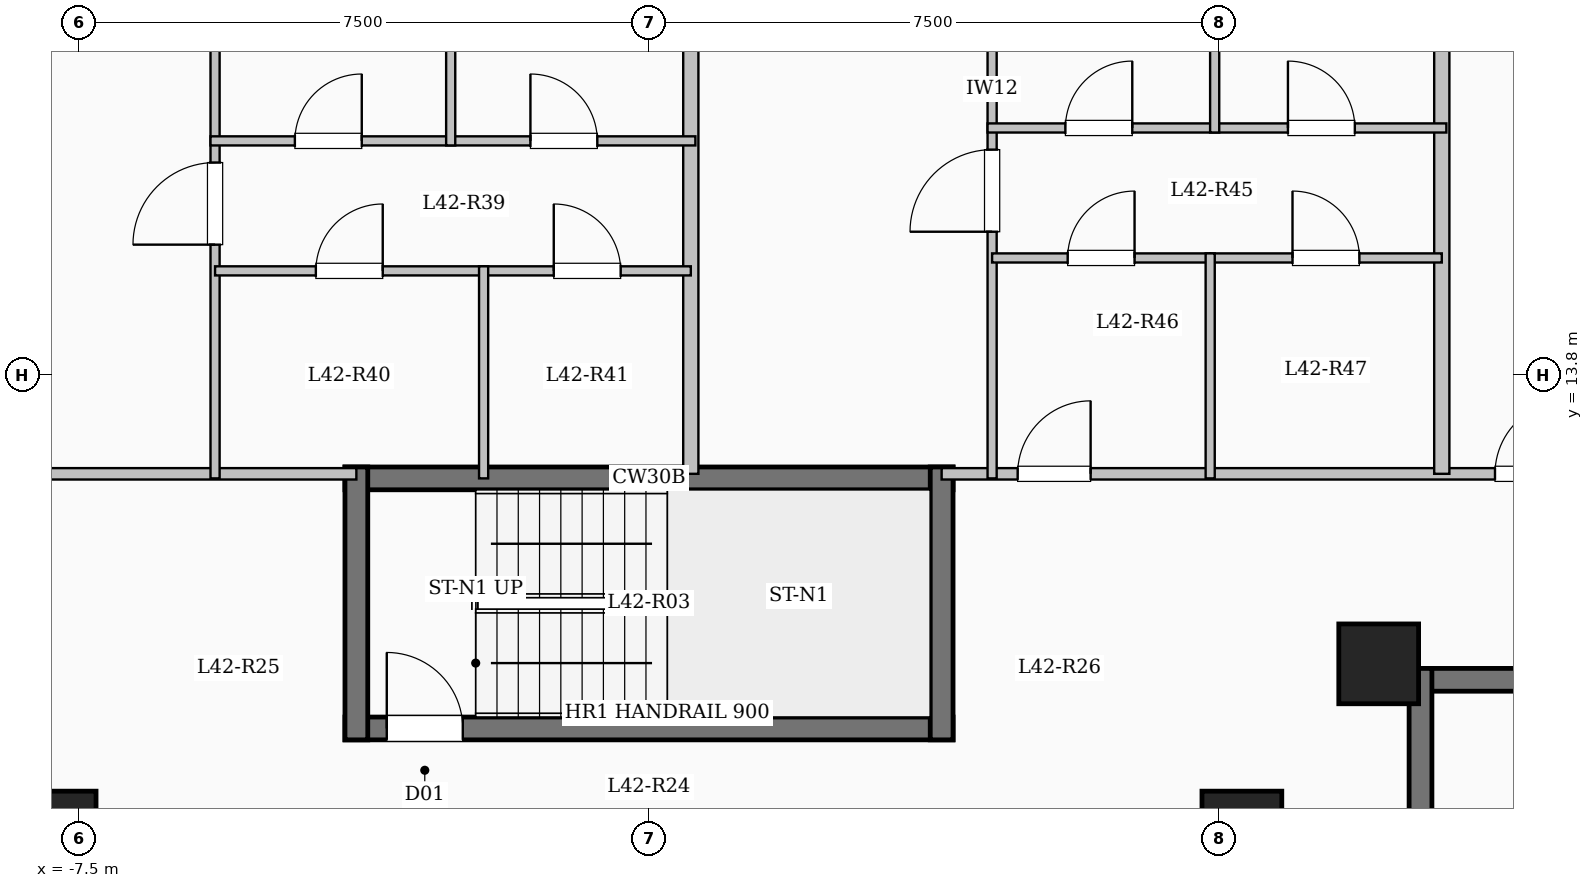
"""IFC4 building model, lengths in metres.
Left out: names, types, materials, properties, quantities, classifications, styles, units other than length and angle.
Written with IfcOpenShell. Run it as: python <this file> out.ifc"""

import sys

from ifc_helpers import new_model, si_unit, direction, frame, frame_2d, origin, origin_2d, place, context, subcontext, project, spatial, rectangle, extrude, element, fill, save


model = new_model("IFC4")
c1 = context("Model", 3, precision=1e-05, world=origin(), true_north=direction((0.0, 1.0)))
c2 = subcontext(c1, "Body", "Model", "MODEL_VIEW")
j1 = project(units=[si_unit("LENGTHUNIT", "METRE"), si_unit("PLANEANGLEUNIT", "RADIAN")], contexts=[c1])
p1 = place(None, origin())
s1 = spatial("IfcSite", under=j1, at=p1, CompositionType="ELEMENT")
p2 = place(p1, origin())
s2 = spatial("IfcBuilding", under=s1, at=p2, CompositionType="ELEMENT")
p3 = place(p2, frame((0.0, 0.0, 156.05)))
s3 = spatial("IfcBuildingStorey", under=s2, at=p3, CompositionType="ELEMENT", Elevation=156.05)
for number, where, z_axis, x_axis in (
    (1, (-7.8, 7.8, 0.0), (0.0, 0.0, 1.0), (1.0, 0.0, 0.0)),
    (2, (7.8, 7.8, 0.0), (0.0, 0.0, 1.0), (1.0, 0.0, 0.0)),
    (3, (9.6, 10.0, 0.0), (0.0, 0.0, 1.0), (1.0, 0.0, 0.0)),
):
    element("IfcColumn", number, at=place(p3, frame(where, z_axis=z_axis, x_axis=x_axis)), inside=s3, PredefinedType="COLUMN", context=c2, shape_type="SweptSolid", body=[
        extrude(rectangle(XDim=1.05, YDim=1.05, at=origin_2d()), origin(), (0.0, 0.0, 1.0), 3.35),
    ])
p4 = place(p3, frame((10.0, 9.79, 0.0), z_axis=(0.0, 0.0, 1.0), x_axis=(1.0, 0.0, 0.0)))
e4 = element("IfcWall", 4, at=p4, inside=s3, PredefinedType="SHEAR", context=c2, shape_type="SweptSolid", body=[
    extrude(rectangle(XDim=8.0, YDim=0.3, at=frame_2d((4.0, 0.0))), origin(), (0.0, 0.0, 1.0), 3.35),
])
p5 = place(p3, frame((10.15, 6.35, 0.0), z_axis=(0.0, 0.0, 1.0), x_axis=(0.0, 1.0, 0.0)))
e5 = element("IfcWall", 5, at=p5, inside=s3, PredefinedType="SHEAR", context=c2, shape_type="SweptSolid", body=[
    extrude(rectangle(XDim=3.59, YDim=0.3, at=frame_2d((1.795, 0.0))), origin(), (0.0, 0.0, 1.0), 3.35),
])
p6 = place(p3, frame((-4.0, 12.44, 0.0), z_axis=(0.0, 0.0, 1.0), x_axis=(1.0, 0.0, 0.0)))
e6 = element("IfcWall", 6, at=p6, inside=s3, PredefinedType="SHEAR", context=c2, shape_type="SweptSolid", body=[
    extrude(rectangle(XDim=8.0, YDim=0.3, at=frame_2d((4.0, 0.0))), origin(), (0.0, 0.0, 1.0), 3.35),
])
p7 = place(p3, frame((-4.0, 9.15, 0.0), z_axis=(0.0, 0.0, 1.0), x_axis=(1.0, 0.0, 0.0)))
e7 = element("IfcWall", 7, at=p7, inside=s3, PredefinedType="SHEAR", context=c2, shape_type="SweptSolid", body=[
    extrude(rectangle(XDim=8.0, YDim=0.3, at=frame_2d((4.0, 0.0))), origin(), (0.0, 0.0, 1.0), 3.35),
])
p8 = place(p7, frame((0.55, 0.0, 0.0)))
e8 = element("IfcOpeningElement", 8, at=p8, cuts=e7, PredefinedType="OPENING", context=c2, shape_type="SweptSolid", body=[
    extrude(rectangle(XDim=1.0, YDim=2.15, at=frame_2d((0.5, 1.075))), frame((0.0, 0.16, 0.0), z_axis=(0.0, -1.0, 0.0), x_axis=(1.0, 0.0, 0.0)), (0.0, 0.0, 1.0), 0.32),
])
for number, where, z_axis, x_axis in (
    (9, (-3.85, 9.0, 0.0), (0.0, 0.0, 1.0), (0.0, 1.0, 0.0)),
    (10, (3.85, 9.0, 0.0), (0.0, 0.0, 1.0), (0.0, 1.0, 0.0)),
):
    element("IfcWall", number, at=place(p3, frame(where, z_axis=z_axis, x_axis=x_axis)), inside=s3, PredefinedType="SHEAR", context=c2, shape_type="SweptSolid", body=[
        extrude(rectangle(XDim=3.59, YDim=0.3, at=frame_2d((1.795, 0.0))), origin(), (0.0, 0.0, 1.0), 3.35),
    ])
p9 = place(p3, frame((-19.55, 12.5, 0.0), z_axis=(0.0, 0.0, 1.0), x_axis=(1.0, 0.0, 0.0)))
e11 = element("IfcWall", 11, at=p9, inside=s3, PredefinedType="PARTITIONING", context=c2, shape_type="SweptSolid", body=[
    extrude(rectangle(XDim=15.7, YDim=0.15, at=frame_2d((7.85, 0.0))), origin(), (0.0, 0.0, 1.0), 3.1),
])
p10 = place(p9, frame((0.7, 0.0, 0.0)))
e12 = element("IfcOpeningElement", 12, at=p10, cuts=e11, PredefinedType="OPENING", context=c2, shape_type="SweptSolid", body=[
    extrude(rectangle(XDim=0.96, YDim=2.15, at=frame_2d((0.48, 1.075))), frame((0.0, 0.085, 0.0), z_axis=(0.0, -1.0, 0.0), x_axis=(1.0, 0.0, 0.0)), (0.0, 0.0, 1.0), 0.17),
])
p11 = place(p9, frame((10.348, 0.0, 0.0)))
e13 = element("IfcOpeningElement", 13, at=p11, cuts=e11, PredefinedType="OPENING", context=c2, shape_type="SweptSolid", body=[
    extrude(rectangle(XDim=0.96, YDim=2.15, at=frame_2d((0.48, 1.075))), frame((0.0, 0.085, 0.0), z_axis=(0.0, -1.0, 0.0), x_axis=(1.0, 0.0, 0.0)), (0.0, 0.0, 1.0), 0.17),
])
p12 = place(p3, frame((3.85, 12.5, 0.0), z_axis=(0.0, 0.0, 1.0), x_axis=(1.0, 0.0, 0.0)))
e14 = element("IfcWall", 14, at=p12, inside=s3, PredefinedType="PARTITIONING", context=c2, shape_type="SweptSolid", body=[
    extrude(rectangle(XDim=15.7, YDim=0.15, at=frame_2d((7.85, 0.0))), origin(), (0.0, 0.0, 1.0), 3.1),
])
p13 = place(p12, frame((1.0, 0.0, 0.0)))
e15 = element("IfcOpeningElement", 15, at=p13, cuts=e14, PredefinedType="OPENING", context=c2, shape_type="SweptSolid", body=[
    extrude(rectangle(XDim=0.96, YDim=2.15, at=frame_2d((0.48, 1.075))), frame((0.0, 0.085, 0.0), z_axis=(0.0, -1.0, 0.0), x_axis=(1.0, 0.0, 0.0)), (0.0, 0.0, 1.0), 0.17),
])
p14 = place(p12, frame((7.28, 0.0, 0.0)))
e16 = element("IfcOpeningElement", 16, at=p14, cuts=e14, PredefinedType="OPENING", context=c2, shape_type="SweptSolid", body=[
    extrude(rectangle(XDim=0.96, YDim=2.15, at=frame_2d((0.48, 1.075))), frame((0.0, 0.085, 0.0), z_axis=(0.0, -1.0, 0.0), x_axis=(1.0, 0.0, 0.0)), (0.0, 0.0, 1.0), 0.17),
])
p15 = place(p3, frame((0.55, 12.5, 0.0), z_axis=(0.0, 0.0, 1.0), x_axis=(0.0, 1.0, 0.0)))
e17 = element("IfcWall", 17, at=p15, inside=s3, PredefinedType="SOLIDWALL", context=c2, shape_type="SweptSolid", body=[
    extrude(rectangle(XDim=10.18, YDim=0.2, at=frame_2d((5.09, 0.0))), origin(), (0.0, 0.0, 1.0), 3.1),
])
p16 = place(p3, frame((-5.709, 12.44, 0.0), z_axis=(0.0, 0.0, 1.0), x_axis=(0.0, 1.0, 0.0)))
e18 = element("IfcWall", 18, at=p16, inside=s3, PredefinedType="PARTITIONING", context=c2, shape_type="SweptSolid", body=[
    extrude(rectangle(XDim=10.065, YDim=0.12, at=frame_2d((5.032, 0.0))), origin(), (0.0, 0.0, 1.0), 3.1),
])
p17 = place(p16, frame((3.075, 0.0, 0.0)))
e19 = element("IfcOpeningElement", 19, at=p17, cuts=e18, PredefinedType="OPENING", context=c2, shape_type="SweptSolid", body=[
    extrude(rectangle(XDim=1.08, YDim=2.15, at=frame_2d((0.54, 1.075))), frame((0.0, 0.07, 0.0), z_axis=(0.0, -1.0, 0.0), x_axis=(1.0, 0.0, 0.0)), (0.0, 0.0, 1.0), 0.14),
])
p18 = place(p3, frame((-5.709, 15.17, 0.0), z_axis=(0.0, 0.0, 1.0), x_axis=(1.0, 0.0, 0.0)))
e20 = element("IfcWall", 20, at=p18, inside=s3, PredefinedType="PARTITIONING", context=c2, shape_type="SweptSolid", body=[
    extrude(rectangle(XDim=3.533, YDim=0.12, at=frame_2d((1.767, 0.0))), origin(), (0.0, 0.0, 1.0), 3.1),
])
p19 = place(p18, frame((1.326, 0.0, 0.0)))
e21 = element("IfcOpeningElement", 21, at=p19, cuts=e20, PredefinedType="OPENING", context=c2, shape_type="SweptSolid", body=[
    extrude(rectangle(XDim=0.88, YDim=2.1, at=frame_2d((0.44, 1.05))), frame((0.0, 0.07, 0.0), z_axis=(0.0, -1.0, 0.0), x_axis=(1.0, 0.0, 0.0)), (0.0, 0.0, 1.0), 0.14),
])
p20 = place(p3, frame((-2.176, 15.17, 0.0), z_axis=(0.0, 0.0, 1.0), x_axis=(1.0, 0.0, 0.0)))
e22 = element("IfcWall", 22, at=p20, inside=s3, PredefinedType="PARTITIONING", context=c2, shape_type="SweptSolid", body=[
    extrude(rectangle(XDim=2.726, YDim=0.12, at=frame_2d((1.363, 0.0))), origin(), (0.0, 0.0, 1.0), 3.1),
])
p21 = place(p20, frame((0.923, 0.0, 0.0)))
e23 = element("IfcOpeningElement", 23, at=p21, cuts=e22, PredefinedType="OPENING", context=c2, shape_type="SweptSolid", body=[
    extrude(rectangle(XDim=0.88, YDim=2.1, at=frame_2d((0.44, 1.05))), frame((0.0, 0.07, 0.0), z_axis=(0.0, -1.0, 0.0), x_axis=(1.0, 0.0, 0.0)), (0.0, 0.0, 1.0), 0.14),
])
p22 = place(p3, frame((-5.769, 16.88, 0.0), z_axis=(0.0, 0.0, 1.0), x_axis=(1.0, 0.0, 0.0)))
e24 = element("IfcWall", 24, at=p22, inside=s3, PredefinedType="PARTITIONING", context=c2, shape_type="SweptSolid", body=[
    extrude(rectangle(XDim=6.379, YDim=0.12, at=frame_2d((3.189, 0.0))), origin(), (0.0, 0.0, 1.0), 2.685),
])
p23 = place(p22, frame((1.11, 0.0, 0.0)))
e25 = element("IfcOpeningElement", 25, at=p23, cuts=e24, PredefinedType="OPENING", context=c2, shape_type="SweptSolid", body=[
    extrude(rectangle(XDim=0.88, YDim=2.1, at=frame_2d((0.44, 1.05))), frame((0.0, 0.07, 0.0), z_axis=(0.0, -1.0, 0.0), x_axis=(1.0, 0.0, 0.0)), (0.0, 0.0, 1.0), 0.14),
])
p24 = place(p22, frame((4.209, 0.0, 0.0)))
e26 = element("IfcOpeningElement", 26, at=p24, cuts=e24, PredefinedType="OPENING", context=c2, shape_type="SweptSolid", body=[
    extrude(rectangle(XDim=0.88, YDim=2.1, at=frame_2d((0.44, 1.05))), frame((0.0, 0.07, 0.0), z_axis=(0.0, -1.0, 0.0), x_axis=(1.0, 0.0, 0.0)), (0.0, 0.0, 1.0), 0.14),
])
p25 = place(p3, frame((-2.176, 12.44, 0.0), z_axis=(0.0, 0.0, 1.0), x_axis=(0.0, 1.0, 0.0)))
e27 = element("IfcWall", 27, at=p25, inside=s3, PredefinedType="PARTITIONING", context=c2, shape_type="SweptSolid", body=[
    extrude(rectangle(XDim=2.79, YDim=0.12, at=frame_2d((1.395, 0.0))), origin(), (0.0, 0.0, 1.0), 3.1),
])
p26 = place(p3, frame((-2.609, 16.82, 0.0), z_axis=(0.0, 0.0, 1.0), x_axis=(0.0, 1.0, 0.0)))
e28 = element("IfcWall", 28, at=p26, inside=s3, PredefinedType="PARTITIONING", context=c2, shape_type="SweptSolid", body=[
    extrude(rectangle(XDim=5.86, YDim=0.12, at=frame_2d((2.93, 0.0))), origin(), (0.0, 0.0, 1.0), 3.1),
])
p27 = place(p3, frame((10.43, 12.5, 0.0), z_axis=(0.0, 0.0, 1.0), x_axis=(0.0, 1.0, 0.0)))
e29 = element("IfcWall", 29, at=p27, inside=s3, PredefinedType="SOLIDWALL", context=c2, shape_type="SweptSolid", body=[
    extrude(rectangle(XDim=8.841, YDim=0.2, at=frame_2d((4.42, 0.0))), origin(), (0.0, 0.0, 1.0), 3.1),
])
p28 = place(p3, frame((4.514, 12.44, 0.0), z_axis=(0.0, 0.0, 1.0), x_axis=(0.0, 1.0, 0.0)))
e30 = element("IfcWall", 30, at=p28, inside=s3, PredefinedType="PARTITIONING", context=c2, shape_type="SweptSolid", body=[
    extrude(rectangle(XDim=10.24, YDim=0.12, at=frame_2d((5.12, 0.0))), origin(), (0.0, 0.0, 1.0), 3.1),
])
p29 = place(p28, frame((3.245, 0.0, 0.0)))
e31 = element("IfcOpeningElement", 31, at=p29, cuts=e30, PredefinedType="OPENING", context=c2, shape_type="SweptSolid", body=[
    extrude(rectangle(XDim=1.08, YDim=2.15, at=frame_2d((0.54, 1.075))), frame((0.0, 0.07, 0.0), z_axis=(0.0, -1.0, 0.0), x_axis=(1.0, 0.0, 0.0)), (0.0, 0.0, 1.0), 0.14),
])
p30 = place(p3, frame((4.514, 15.34, 0.0), z_axis=(0.0, 0.0, 1.0), x_axis=(1.0, 0.0, 0.0)))
e32 = element("IfcWall", 32, at=p30, inside=s3, PredefinedType="PARTITIONING", context=c2, shape_type="SweptSolid", body=[
    extrude(rectangle(XDim=2.869, YDim=0.12, at=frame_2d((1.435, 0.0))), origin(), (0.0, 0.0, 1.0), 3.1),
])
p31 = place(p30, frame((0.994, 0.0, 0.0)))
e33 = element("IfcOpeningElement", 33, at=p31, cuts=e32, PredefinedType="OPENING", context=c2, shape_type="SweptSolid", body=[
    extrude(rectangle(XDim=0.88, YDim=2.1, at=frame_2d((0.44, 1.05))), frame((0.0, 0.07, 0.0), z_axis=(0.0, -1.0, 0.0), x_axis=(1.0, 0.0, 0.0)), (0.0, 0.0, 1.0), 0.14),
])
p32 = place(p3, frame((7.383, 15.34, 0.0), z_axis=(0.0, 0.0, 1.0), x_axis=(1.0, 0.0, 0.0)))
e34 = element("IfcWall", 34, at=p32, inside=s3, PredefinedType="PARTITIONING", context=c2, shape_type="SweptSolid", body=[
    extrude(rectangle(XDim=3.047, YDim=0.12, at=frame_2d((1.523, 0.0))), origin(), (0.0, 0.0, 1.0), 3.1),
])
p33 = place(p32, frame((1.083, 0.0, 0.0)))
e35 = element("IfcOpeningElement", 35, at=p33, cuts=e34, PredefinedType="OPENING", context=c2, shape_type="SweptSolid", body=[
    extrude(rectangle(XDim=0.88, YDim=2.1, at=frame_2d((0.44, 1.05))), frame((0.0, 0.07, 0.0), z_axis=(0.0, -1.0, 0.0), x_axis=(1.0, 0.0, 0.0)), (0.0, 0.0, 1.0), 0.14),
])
p34 = place(p3, frame((4.454, 17.05, 0.0), z_axis=(0.0, 0.0, 1.0), x_axis=(1.0, 0.0, 0.0)))
e36 = element("IfcWall", 36, at=p34, inside=s3, PredefinedType="PARTITIONING", context=c2, shape_type="SweptSolid", body=[
    extrude(rectangle(XDim=6.036, YDim=0.12, at=frame_2d((3.018, 0.0))), origin(), (0.0, 0.0, 1.0), 2.685),
])
p35 = place(p34, frame((1.024, 0.0, 0.0)))
e37 = element("IfcOpeningElement", 37, at=p35, cuts=e36, PredefinedType="OPENING", context=c2, shape_type="SweptSolid", body=[
    extrude(rectangle(XDim=0.88, YDim=2.1, at=frame_2d((0.44, 1.05))), frame((0.0, 0.07, 0.0), z_axis=(0.0, -1.0, 0.0), x_axis=(1.0, 0.0, 0.0)), (0.0, 0.0, 1.0), 0.14),
])
p36 = place(p34, frame((3.952, 0.0, 0.0)))
e38 = element("IfcOpeningElement", 38, at=p36, cuts=e36, PredefinedType="OPENING", context=c2, shape_type="SweptSolid", body=[
    extrude(rectangle(XDim=0.88, YDim=2.1, at=frame_2d((0.44, 1.05))), frame((0.0, 0.07, 0.0), z_axis=(0.0, -1.0, 0.0), x_axis=(1.0, 0.0, 0.0)), (0.0, 0.0, 1.0), 0.14),
])
p37 = place(p3, frame((7.383, 12.44, 0.0), z_axis=(0.0, 0.0, 1.0), x_axis=(0.0, 1.0, 0.0)))
e39 = element("IfcWall", 39, at=p37, inside=s3, PredefinedType="PARTITIONING", context=c2, shape_type="SweptSolid", body=[
    extrude(rectangle(XDim=2.96, YDim=0.12, at=frame_2d((1.48, 0.0))), origin(), (0.0, 0.0, 1.0), 2.585),
])
p38 = place(p3, frame((7.442, 16.99, 0.0), z_axis=(0.0, 0.0, 1.0), x_axis=(0.0, 1.0, 0.0)))
e40 = element("IfcWall", 40, at=p38, inside=s3, PredefinedType="PARTITIONING", context=c2, shape_type="SweptSolid", body=[
    extrude(rectangle(XDim=5.088, YDim=0.12, at=frame_2d((2.544, 0.0))), origin(), (0.0, 0.0, 1.0), 2.585),
])
p39 = place(p8, origin())
e41 = element("IfcDoor", 41, at=p39, inside=s3, OperationType="SINGLE_SWING_LEFT", PredefinedType="DOOR", context=c2, shape_type="SweptSolid", body=[
    extrude(rectangle(XDim=1.0, YDim=2.15, at=frame_2d((0.5, 1.075))), frame((0.0, 0.025, 0.0), z_axis=(0.0, -1.0, 0.0), x_axis=(1.0, 0.0, 0.0)), (0.0, 0.0, 1.0), 0.05),
])
fill(e8, e41)
p40 = place(p17, origin())
e42 = element("IfcDoor", 42, at=p40, inside=s3, OperationType="SINGLE_SWING_LEFT", PredefinedType="DOOR", context=c2, shape_type="SweptSolid", body=[
    extrude(rectangle(XDim=1.08, YDim=2.15, at=frame_2d((0.54, 1.075))), frame((0.0, 0.025, 0.0), z_axis=(0.0, -1.0, 0.0), x_axis=(1.0, 0.0, 0.0)), (0.0, 0.0, 1.0), 0.05),
])
fill(e19, e42)
p41 = place(p19, origin())
e43 = element("IfcDoor", 43, at=p41, inside=s3, OperationType="SINGLE_SWING_RIGHT", PredefinedType="DOOR", context=c2, shape_type="SweptSolid", body=[
    extrude(rectangle(XDim=0.88, YDim=2.1, at=frame_2d((0.44, 1.05))), frame((0.0, 0.025, 0.0), z_axis=(0.0, -1.0, 0.0), x_axis=(1.0, 0.0, 0.0)), (0.0, 0.0, 1.0), 0.05),
])
fill(e21, e43)
p42 = place(p21, origin())
e44 = element("IfcDoor", 44, at=p42, inside=s3, OperationType="SINGLE_SWING_LEFT", PredefinedType="DOOR", context=c2, shape_type="SweptSolid", body=[
    extrude(rectangle(XDim=0.88, YDim=2.1, at=frame_2d((0.44, 1.05))), frame((0.0, 0.025, 0.0), z_axis=(0.0, -1.0, 0.0), x_axis=(1.0, 0.0, 0.0)), (0.0, 0.0, 1.0), 0.05),
])
fill(e23, e44)
p43 = place(p23, origin())
e45 = element("IfcDoor", 45, at=p43, inside=s3, OperationType="SINGLE_SWING_RIGHT", PredefinedType="DOOR", context=c2, shape_type="SweptSolid", body=[
    extrude(rectangle(XDim=0.88, YDim=2.1, at=frame_2d((0.44, 1.05))), frame((0.0, 0.025, 0.0), z_axis=(0.0, -1.0, 0.0), x_axis=(1.0, 0.0, 0.0)), (0.0, 0.0, 1.0), 0.05),
])
fill(e25, e45)
p44 = place(p24, origin())
e46 = element("IfcDoor", 46, at=p44, inside=s3, OperationType="SINGLE_SWING_LEFT", PredefinedType="DOOR", context=c2, shape_type="SweptSolid", body=[
    extrude(rectangle(XDim=0.88, YDim=2.1, at=frame_2d((0.44, 1.05))), frame((0.0, 0.025, 0.0), z_axis=(0.0, -1.0, 0.0), x_axis=(1.0, 0.0, 0.0)), (0.0, 0.0, 1.0), 0.05),
])
fill(e26, e46)
p45 = place(p13, origin())
e47 = element("IfcDoor", 47, at=p45, inside=s3, OperationType="SINGLE_SWING_RIGHT", PredefinedType="DOOR", context=c2, shape_type="SweptSolid", body=[
    extrude(rectangle(XDim=0.96, YDim=2.15, at=frame_2d((0.48, 1.075))), frame((0.0, 0.025, 0.0), z_axis=(0.0, -1.0, 0.0), x_axis=(1.0, 0.0, 0.0)), (0.0, 0.0, 1.0), 0.05),
])
fill(e15, e47)
p46 = place(p29, origin())
e48 = element("IfcDoor", 48, at=p46, inside=s3, OperationType="SINGLE_SWING_LEFT", PredefinedType="DOOR", context=c2, shape_type="SweptSolid", body=[
    extrude(rectangle(XDim=1.08, YDim=2.15, at=frame_2d((0.54, 1.075))), frame((0.0, 0.025, 0.0), z_axis=(0.0, -1.0, 0.0), x_axis=(1.0, 0.0, 0.0)), (0.0, 0.0, 1.0), 0.05),
])
fill(e31, e48)
p47 = place(p31, origin())
e49 = element("IfcDoor", 49, at=p47, inside=s3, OperationType="SINGLE_SWING_RIGHT", PredefinedType="DOOR", context=c2, shape_type="SweptSolid", body=[
    extrude(rectangle(XDim=0.88, YDim=2.1, at=frame_2d((0.44, 1.05))), frame((0.0, 0.025, 0.0), z_axis=(0.0, -1.0, 0.0), x_axis=(1.0, 0.0, 0.0)), (0.0, 0.0, 1.0), 0.05),
])
fill(e33, e49)
p48 = place(p33, origin())
e50 = element("IfcDoor", 50, at=p48, inside=s3, OperationType="SINGLE_SWING_LEFT", PredefinedType="DOOR", context=c2, shape_type="SweptSolid", body=[
    extrude(rectangle(XDim=0.88, YDim=2.1, at=frame_2d((0.44, 1.05))), frame((0.0, 0.025, 0.0), z_axis=(0.0, -1.0, 0.0), x_axis=(1.0, 0.0, 0.0)), (0.0, 0.0, 1.0), 0.05),
])
fill(e35, e50)
p49 = place(p35, origin())
e51 = element("IfcDoor", 51, at=p49, inside=s3, OperationType="SINGLE_SWING_RIGHT", PredefinedType="DOOR", context=c2, shape_type="SweptSolid", body=[
    extrude(rectangle(XDim=0.88, YDim=2.1, at=frame_2d((0.44, 1.05))), frame((0.0, 0.025, 0.0), z_axis=(0.0, -1.0, 0.0), x_axis=(1.0, 0.0, 0.0)), (0.0, 0.0, 1.0), 0.05),
])
fill(e37, e51)
p50 = place(p36, origin())
e52 = element("IfcDoor", 52, at=p50, inside=s3, OperationType="SINGLE_SWING_LEFT", PredefinedType="DOOR", context=c2, shape_type="SweptSolid", body=[
    extrude(rectangle(XDim=0.88, YDim=2.1, at=frame_2d((0.44, 1.05))), frame((0.0, 0.025, 0.0), z_axis=(0.0, -1.0, 0.0), x_axis=(1.0, 0.0, 0.0)), (0.0, 0.0, 1.0), 0.05),
])
fill(e38, e52)
p51 = place(p14, origin())
e53 = element("IfcDoor", 53, at=p51, inside=s3, OperationType="SINGLE_SWING_RIGHT", PredefinedType="DOOR", context=c2, shape_type="SweptSolid", body=[
    extrude(rectangle(XDim=0.96, YDim=2.15, at=frame_2d((0.48, 1.075))), frame((0.0, 0.025, 0.0), z_axis=(0.0, -1.0, 0.0), x_axis=(1.0, 0.0, 0.0)), (0.0, 0.0, 1.0), 0.05),
])
fill(e16, e53)
save(model, sys.argv[1])
